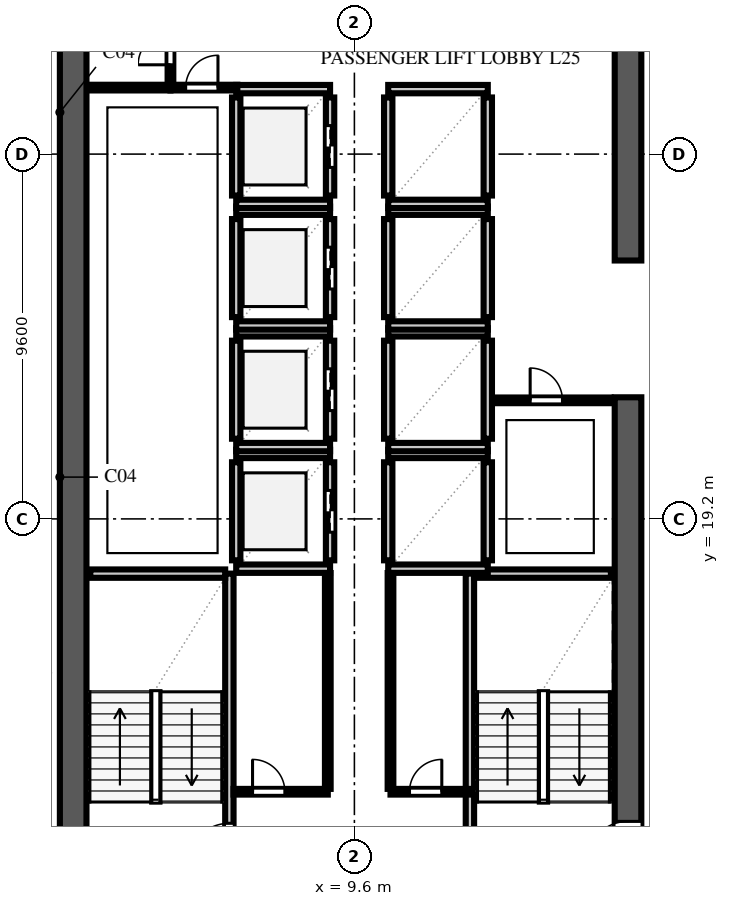
"""IFC4 building model, lengths in metres.
Left out: names, types, materials, properties, quantities, classifications, styles, units other than length and angle.
Written with IfcOpenShell. Run it as: python <this file> out.ifc"""

import sys

from ifc_helpers import new_model, si_unit, direction, frame, frame_2d, origin, place, context, subcontext, project, spatial, rectangle, extrude, element, fill, save


model = new_model("IFC4")
c1 = context("Model", 3, precision=1e-05, world=origin(), true_north=direction((0.0, 1.0)))
c2 = subcontext(c1, "Body", "Model", "MODEL_VIEW")
j1 = project(units=[si_unit("LENGTHUNIT", "METRE"), si_unit("PLANEANGLEUNIT", "RADIAN")], contexts=[c1])
p1 = place(None, origin())
s1 = spatial("IfcSite", under=j1, at=p1, CompositionType="ELEMENT")
p2 = place(p1, origin())
s2 = spatial("IfcBuilding", under=s1, at=p2, CompositionType="ELEMENT")
p3 = place(p2, frame((0.0, 0.0, 101.4)))
s3 = spatial("IfcBuildingStorey", under=s2, at=p3, CompositionType="ELEMENT", Elevation=101.4)
p4 = place(p3, frame((2.2, 9.25, 0.0), z_axis=(0.0, 0.0, 1.0), x_axis=(0.0, 1.0, 0.0)))
e1 = element("IfcWall", 1, at=p4, inside=s3, PredefinedType="SHEAR", context=c2, shape_type="SweptSolid", body=[
    extrude(rectangle(XDim=39.1, YDim=0.7, at=frame_2d((19.55, 0.0))), origin(), (0.0, 0.0, 1.0), 3.54),
])
p5 = place(p3, frame((16.8, 9.95, 0.0), z_axis=(0.0, 0.0, 1.0), x_axis=(0.0, 1.0, 0.0)))
e2 = element("IfcWall", 2, at=p5, inside=s3, PredefinedType="SHEAR", context=c2, shape_type="SweptSolid", body=[
    extrude(rectangle(XDim=12.45, YDim=0.7, at=frame_2d((6.225, 0.0))), origin(), (0.0, 0.0, 1.0), 3.54),
])
p6 = place(p5, frame((0.19, 0.0, 0.0)))
e3 = element("IfcOpeningElement", 3, at=p6, cuts=e2, PredefinedType="OPENING", context=c2, shape_type="SweptSolid", body=[
    extrude(rectangle(XDim=1.1, YDim=2.2, at=frame_2d((0.55, 1.1))), frame((0.0, 0.362, 0.0), z_axis=(0.0, -1.0, 0.0), x_axis=(1.0, 0.0, 0.0)), (0.0, 0.0, 1.0), 0.724),
])
p7 = place(p3, frame((16.8, 26.0, 0.0), z_axis=(0.0, 0.0, 1.0), x_axis=(0.0, 1.0, 0.0)))
e4 = element("IfcWall", 4, at=p7, inside=s3, PredefinedType="SHEAR", context=c2, shape_type="SweptSolid", body=[
    extrude(rectangle(XDim=7.8, YDim=0.7, at=frame_2d((3.9, 0.0))), origin(), (0.0, 0.0, 1.0), 3.54),
])
p8 = place(p3, frame((6.31, 9.95, 0.0), z_axis=(0.0, 0.0, 1.0), x_axis=(0.0, 1.0, 0.0)))
e5 = element("IfcWall", 5, at=p8, inside=s3, PredefinedType="SOLIDWALL", context=c2, shape_type="SweptSolid", body=[
    extrude(rectangle(XDim=7.81, YDim=0.22, at=frame_2d((3.905, 0.0))), origin(), (0.0, 0.0, 1.0), 3.54),
])
p9 = place(p8, frame((0.14, 0.0, 0.0)))
e6 = element("IfcOpeningElement", 6, at=p9, cuts=e5, PredefinedType="OPENING", context=c2, shape_type="SweptSolid", body=[
    extrude(rectangle(XDim=1.1, YDim=2.2, at=frame_2d((0.55, 1.1))), frame((0.0, 0.122, 0.0), z_axis=(0.0, -1.0, 0.0), x_axis=(1.0, 0.0, 0.0)), (0.0, 0.0, 1.0), 0.244),
])
p10 = place(p3, frame((2.65, 17.76, 0.0), z_axis=(0.0, 0.0, 1.0), x_axis=(1.0, 0.0, 0.0)))
e7 = element("IfcWall", 7, at=p10, inside=s3, PredefinedType="SOLIDWALL", context=c2, shape_type="SweptSolid", body=[
    extrude(rectangle(XDim=3.55, YDim=0.22, at=frame_2d((1.775, 0.0))), origin(), (0.0, 0.0, 1.0), 3.54),
])
p11 = place(p3, frame((12.64, 10.05, 0.0), z_axis=(0.0, 0.0, 1.0), x_axis=(0.0, 1.0, 0.0)))
e8 = element("IfcWall", 8, at=p11, inside=s3, PredefinedType="SOLIDWALL", context=c2, shape_type="SweptSolid", body=[
    extrude(rectangle(XDim=7.71, YDim=0.22, at=frame_2d((3.855, 0.0))), origin(), (0.0, 0.0, 1.0), 3.54),
])
p12 = place(p3, frame((12.75, 17.76, 0.0), z_axis=(0.0, 0.0, 1.0), x_axis=(1.0, 0.0, 0.0)))
e9 = element("IfcWall", 9, at=p12, inside=s3, PredefinedType="SOLIDWALL", context=c2, shape_type="SweptSolid", body=[
    extrude(rectangle(XDim=3.6, YDim=0.22, at=frame_2d((1.8, 0.0))), origin(), (0.0, 0.0, 1.0), 3.54),
])
p13 = place(p3, frame((6.49, 18.11, 0.0), z_axis=(0.0, 0.0, 1.0), x_axis=(0.0, 1.0, 0.0)))
e10 = element("IfcWall", 10, at=p13, inside=s3, PredefinedType="SOLIDWALL", context=c2, shape_type="SweptSolid", body=[
    extrude(rectangle(XDim=2.58, YDim=0.22, at=frame_2d((1.29, 0.0))), origin(), (0.0, 0.0, 1.0), 3.54),
])
p14 = place(p3, frame((8.96, 18.11, 0.0), z_axis=(0.0, 0.0, 1.0), x_axis=(0.0, 1.0, 0.0)))
e11 = element("IfcWall", 11, at=p14, inside=s3, PredefinedType="SOLIDWALL", context=c2, shape_type="SweptSolid", body=[
    extrude(rectangle(XDim=2.58, YDim=0.22, at=frame_2d((1.29, 0.0))), origin(), (0.0, 0.0, 1.0), 3.54),
])
p15 = place(p14, frame((0.74, 0.0, 0.0)))
e12 = element("IfcOpeningElement", 12, at=p15, cuts=e11, PredefinedType="OPENING", context=c2, shape_type="SweptSolid", body=[
    extrude(rectangle(XDim=1.1, YDim=2.2, at=frame_2d((0.55, 1.1))), frame((0.0, 0.122, 0.0), z_axis=(0.0, -1.0, 0.0), x_axis=(1.0, 0.0, 0.0)), (0.0, 0.0, 1.0), 0.244),
])
for number, where, z_axis, x_axis in (
    (13, (6.49, 17.89, 0.0), (0.0, 0.0, 1.0), (1.0, 0.0, 0.0)),
    (14, (6.49, 20.91, 0.0), (0.0, 0.0, 1.0), (1.0, 0.0, 0.0)),
):
    element("IfcWall", number, at=place(p3, frame(where, z_axis=z_axis, x_axis=x_axis)), inside=s3, PredefinedType="SOLIDWALL", context=c2, shape_type="SweptSolid", body=[
        extrude(rectangle(XDim=2.47, YDim=0.22, at=frame_2d((1.235, 0.0))), origin(), (0.0, 0.0, 1.0), 3.54),
    ])
p16 = place(p3, frame((6.49, 21.31, 0.0), z_axis=(0.0, 0.0, 1.0), x_axis=(0.0, 1.0, 0.0)))
e15 = element("IfcWall", 15, at=p16, inside=s3, PredefinedType="SOLIDWALL", context=c2, shape_type="SweptSolid", body=[
    extrude(rectangle(XDim=2.58, YDim=0.22, at=frame_2d((1.29, 0.0))), origin(), (0.0, 0.0, 1.0), 3.54),
])
p17 = place(p3, frame((8.96, 21.31, 0.0), z_axis=(0.0, 0.0, 1.0), x_axis=(0.0, 1.0, 0.0)))
e16 = element("IfcWall", 16, at=p17, inside=s3, PredefinedType="SOLIDWALL", context=c2, shape_type="SweptSolid", body=[
    extrude(rectangle(XDim=2.58, YDim=0.22, at=frame_2d((1.29, 0.0))), origin(), (0.0, 0.0, 1.0), 3.54),
])
p18 = place(p17, frame((0.74, 0.0, 0.0)))
e17 = element("IfcOpeningElement", 17, at=p18, cuts=e16, PredefinedType="OPENING", context=c2, shape_type="SweptSolid", body=[
    extrude(rectangle(XDim=1.1, YDim=2.2, at=frame_2d((0.55, 1.1))), frame((0.0, 0.122, 0.0), z_axis=(0.0, -1.0, 0.0), x_axis=(1.0, 0.0, 0.0)), (0.0, 0.0, 1.0), 0.244),
])
for number, where, z_axis, x_axis in (
    (18, (6.49, 21.09, 0.0), (0.0, 0.0, 1.0), (1.0, 0.0, 0.0)),
    (19, (6.49, 24.11, 0.0), (0.0, 0.0, 1.0), (1.0, 0.0, 0.0)),
):
    element("IfcWall", number, at=place(p3, frame(where, z_axis=z_axis, x_axis=x_axis)), inside=s3, PredefinedType="SOLIDWALL", context=c2, shape_type="SweptSolid", body=[
        extrude(rectangle(XDim=2.47, YDim=0.22, at=frame_2d((1.235, 0.0))), origin(), (0.0, 0.0, 1.0), 3.54),
    ])
p19 = place(p3, frame((6.49, 24.51, 0.0), z_axis=(0.0, 0.0, 1.0), x_axis=(0.0, 1.0, 0.0)))
e20 = element("IfcWall", 20, at=p19, inside=s3, PredefinedType="SOLIDWALL", context=c2, shape_type="SweptSolid", body=[
    extrude(rectangle(XDim=2.58, YDim=0.22, at=frame_2d((1.29, 0.0))), origin(), (0.0, 0.0, 1.0), 3.54),
])
p20 = place(p3, frame((8.96, 24.51, 0.0), z_axis=(0.0, 0.0, 1.0), x_axis=(0.0, 1.0, 0.0)))
e21 = element("IfcWall", 21, at=p20, inside=s3, PredefinedType="SOLIDWALL", context=c2, shape_type="SweptSolid", body=[
    extrude(rectangle(XDim=2.58, YDim=0.22, at=frame_2d((1.29, 0.0))), origin(), (0.0, 0.0, 1.0), 3.54),
])
p21 = place(p20, frame((0.74, 0.0, 0.0)))
e22 = element("IfcOpeningElement", 22, at=p21, cuts=e21, PredefinedType="OPENING", context=c2, shape_type="SweptSolid", body=[
    extrude(rectangle(XDim=1.1, YDim=2.2, at=frame_2d((0.55, 1.1))), frame((0.0, 0.122, 0.0), z_axis=(0.0, -1.0, 0.0), x_axis=(1.0, 0.0, 0.0)), (0.0, 0.0, 1.0), 0.244),
])
for number, where, z_axis, x_axis in (
    (23, (6.49, 24.29, 0.0), (0.0, 0.0, 1.0), (1.0, 0.0, 0.0)),
    (24, (6.49, 27.31, 0.0), (0.0, 0.0, 1.0), (1.0, 0.0, 0.0)),
):
    element("IfcWall", number, at=place(p3, frame(where, z_axis=z_axis, x_axis=x_axis)), inside=s3, PredefinedType="SOLIDWALL", context=c2, shape_type="SweptSolid", body=[
        extrude(rectangle(XDim=2.47, YDim=0.22, at=frame_2d((1.235, 0.0))), origin(), (0.0, 0.0, 1.0), 3.54),
    ])
p22 = place(p3, frame((6.49, 27.71, 0.0), z_axis=(0.0, 0.0, 1.0), x_axis=(0.0, 1.0, 0.0)))
e25 = element("IfcWall", 25, at=p22, inside=s3, PredefinedType="SOLIDWALL", context=c2, shape_type="SweptSolid", body=[
    extrude(rectangle(XDim=2.58, YDim=0.22, at=frame_2d((1.29, 0.0))), origin(), (0.0, 0.0, 1.0), 3.54),
])
p23 = place(p3, frame((8.96, 27.71, 0.0), z_axis=(0.0, 0.0, 1.0), x_axis=(0.0, 1.0, 0.0)))
e26 = element("IfcWall", 26, at=p23, inside=s3, PredefinedType="SOLIDWALL", context=c2, shape_type="SweptSolid", body=[
    extrude(rectangle(XDim=2.58, YDim=0.22, at=frame_2d((1.29, 0.0))), origin(), (0.0, 0.0, 1.0), 3.54),
])
p24 = place(p23, frame((0.74, 0.0, 0.0)))
e27 = element("IfcOpeningElement", 27, at=p24, cuts=e26, PredefinedType="OPENING", context=c2, shape_type="SweptSolid", body=[
    extrude(rectangle(XDim=1.1, YDim=2.2, at=frame_2d((0.55, 1.1))), frame((0.0, 0.122, 0.0), z_axis=(0.0, -1.0, 0.0), x_axis=(1.0, 0.0, 0.0)), (0.0, 0.0, 1.0), 0.244),
])
for number, where, z_axis, x_axis in (
    (28, (6.49, 27.49, 0.0), (0.0, 0.0, 1.0), (1.0, 0.0, 0.0)),
    (29, (6.49, 30.51, 0.0), (0.0, 0.0, 1.0), (1.0, 0.0, 0.0)),
):
    element("IfcWall", number, at=place(p3, frame(where, z_axis=z_axis, x_axis=x_axis)), inside=s3, PredefinedType="SOLIDWALL", context=c2, shape_type="SweptSolid", body=[
        extrude(rectangle(XDim=2.47, YDim=0.22, at=frame_2d((1.235, 0.0))), origin(), (0.0, 0.0, 1.0), 3.54),
    ])
for number, where, z_axis, x_axis in (
    (30, (10.49, 18.11, 0.0), (0.0, 0.0, 1.0), (0.0, 1.0, 0.0)),
    (31, (13.11, 18.11, 0.0), (0.0, 0.0, 1.0), (0.0, 1.0, 0.0)),
):
    element("IfcWall", number, at=place(p3, frame(where, z_axis=z_axis, x_axis=x_axis)), inside=s3, PredefinedType="SOLIDWALL", context=c2, shape_type="SweptSolid", body=[
        extrude(rectangle(XDim=2.58, YDim=0.22, at=frame_2d((1.29, 0.0))), origin(), (0.0, 0.0, 1.0), 3.54),
    ])
for number, where, z_axis, x_axis in (
    (32, (10.49, 17.89, 0.0), (0.0, 0.0, 1.0), (1.0, 0.0, 0.0)),
    (33, (10.49, 20.91, 0.0), (0.0, 0.0, 1.0), (1.0, 0.0, 0.0)),
):
    element("IfcWall", number, at=place(p3, frame(where, z_axis=z_axis, x_axis=x_axis)), inside=s3, PredefinedType="SOLIDWALL", context=c2, shape_type="SweptSolid", body=[
        extrude(rectangle(XDim=2.62, YDim=0.22, at=frame_2d((1.31, 0.0))), origin(), (0.0, 0.0, 1.0), 3.54),
    ])
for number, where, z_axis, x_axis in (
    (34, (10.49, 21.31, 0.0), (0.0, 0.0, 1.0), (0.0, 1.0, 0.0)),
    (35, (13.11, 21.31, 0.0), (0.0, 0.0, 1.0), (0.0, 1.0, 0.0)),
):
    element("IfcWall", number, at=place(p3, frame(where, z_axis=z_axis, x_axis=x_axis)), inside=s3, PredefinedType="SOLIDWALL", context=c2, shape_type="SweptSolid", body=[
        extrude(rectangle(XDim=2.58, YDim=0.22, at=frame_2d((1.29, 0.0))), origin(), (0.0, 0.0, 1.0), 3.54),
    ])
for number, where, z_axis, x_axis in (
    (36, (10.49, 21.09, 0.0), (0.0, 0.0, 1.0), (1.0, 0.0, 0.0)),
    (37, (10.49, 24.11, 0.0), (0.0, 0.0, 1.0), (1.0, 0.0, 0.0)),
):
    element("IfcWall", number, at=place(p3, frame(where, z_axis=z_axis, x_axis=x_axis)), inside=s3, PredefinedType="SOLIDWALL", context=c2, shape_type="SweptSolid", body=[
        extrude(rectangle(XDim=2.62, YDim=0.22, at=frame_2d((1.31, 0.0))), origin(), (0.0, 0.0, 1.0), 3.54),
    ])
for number, where, z_axis, x_axis in (
    (38, (10.49, 24.51, 0.0), (0.0, 0.0, 1.0), (0.0, 1.0, 0.0)),
    (39, (13.11, 24.51, 0.0), (0.0, 0.0, 1.0), (0.0, 1.0, 0.0)),
):
    element("IfcWall", number, at=place(p3, frame(where, z_axis=z_axis, x_axis=x_axis)), inside=s3, PredefinedType="SOLIDWALL", context=c2, shape_type="SweptSolid", body=[
        extrude(rectangle(XDim=2.58, YDim=0.22, at=frame_2d((1.29, 0.0))), origin(), (0.0, 0.0, 1.0), 3.54),
    ])
for number, where, z_axis, x_axis in (
    (40, (10.49, 24.29, 0.0), (0.0, 0.0, 1.0), (1.0, 0.0, 0.0)),
    (41, (10.49, 27.31, 0.0), (0.0, 0.0, 1.0), (1.0, 0.0, 0.0)),
):
    element("IfcWall", number, at=place(p3, frame(where, z_axis=z_axis, x_axis=x_axis)), inside=s3, PredefinedType="SOLIDWALL", context=c2, shape_type="SweptSolid", body=[
        extrude(rectangle(XDim=2.62, YDim=0.22, at=frame_2d((1.31, 0.0))), origin(), (0.0, 0.0, 1.0), 3.54),
    ])
for number, where, z_axis, x_axis in (
    (42, (10.49, 27.71, 0.0), (0.0, 0.0, 1.0), (0.0, 1.0, 0.0)),
    (43, (13.11, 27.71, 0.0), (0.0, 0.0, 1.0), (0.0, 1.0, 0.0)),
):
    element("IfcWall", number, at=place(p3, frame(where, z_axis=z_axis, x_axis=x_axis)), inside=s3, PredefinedType="SOLIDWALL", context=c2, shape_type="SweptSolid", body=[
        extrude(rectangle(XDim=2.58, YDim=0.22, at=frame_2d((1.29, 0.0))), origin(), (0.0, 0.0, 1.0), 3.54),
    ])
for number, where, z_axis, x_axis in (
    (44, (10.49, 27.49, 0.0), (0.0, 0.0, 1.0), (1.0, 0.0, 0.0)),
    (45, (10.49, 30.51, 0.0), (0.0, 0.0, 1.0), (1.0, 0.0, 0.0)),
):
    element("IfcWall", number, at=place(p3, frame(where, z_axis=z_axis, x_axis=x_axis)), inside=s3, PredefinedType="SOLIDWALL", context=c2, shape_type="SweptSolid", body=[
        extrude(rectangle(XDim=2.62, YDim=0.22, at=frame_2d((1.31, 0.0))), origin(), (0.0, 0.0, 1.0), 3.54),
    ])
p25 = place(p3, frame((6.42, 12.02, 0.0), z_axis=(0.0, 0.0, 1.0), x_axis=(1.0, 0.0, 0.0)))
e46 = element("IfcWall", 46, at=p25, inside=s3, PredefinedType="PARTITIONING", context=c2, shape_type="SweptSolid", body=[
    extrude(rectangle(XDim=2.48, YDim=0.15, at=frame_2d((1.24, 0.0))), origin(), (0.0, 0.0, 1.0), 3.54),
])
p26 = place(p25, frame((0.5, 0.0, 0.0)))
e47 = element("IfcOpeningElement", 47, at=p26, cuts=e46, PredefinedType="OPENING", context=c2, shape_type="SweptSolid", body=[
    extrude(rectangle(XDim=0.85, YDim=2.1, at=frame_2d((0.425, 1.05))), frame((0.0, 0.087, 0.0), z_axis=(0.0, -1.0, 0.0), x_axis=(1.0, 0.0, 0.0)), (0.0, 0.0, 1.0), 0.174),
])
p27 = place(p3, frame((10.55, 12.02, 0.0), z_axis=(0.0, 0.0, 1.0), x_axis=(1.0, 0.0, 0.0)))
e48 = element("IfcWall", 48, at=p27, inside=s3, PredefinedType="PARTITIONING", context=c2, shape_type="SweptSolid", body=[
    extrude(rectangle(XDim=2.08, YDim=0.15, at=frame_2d((1.04, 0.0))), origin(), (0.0, 0.0, 1.0), 3.54),
])
p28 = place(p27, frame((0.5, 0.0, 0.0)))
e49 = element("IfcOpeningElement", 49, at=p28, cuts=e48, PredefinedType="OPENING", context=c2, shape_type="SweptSolid", body=[
    extrude(rectangle(XDim=0.85, YDim=2.1, at=frame_2d((0.425, 1.05))), frame((0.0, 0.087, 0.0), z_axis=(0.0, -1.0, 0.0), x_axis=(1.0, 0.0, 0.0)), (0.0, 0.0, 1.0), 0.174),
])
for number, where, z_axis, x_axis in (
    (50, (8.9, 12.095, 0.0), (0.0, 0.0, 1.0), (0.0, 1.0, 0.0)),
    (51, (10.55, 12.095, 0.0), (0.0, 0.0, 1.0), (0.0, 1.0, 0.0)),
):
    element("IfcWall", number, at=place(p3, frame(where, z_axis=z_axis, x_axis=x_axis)), inside=s3, PredefinedType="PARTITIONING", context=c2, shape_type="SweptSolid", body=[
        extrude(rectangle(XDim=5.68, YDim=0.15, at=frame_2d((2.84, 0.0))), origin(), (0.0, 0.0, 1.0), 3.54),
    ])
p29 = place(p3, frame((13.225, 22.32, 0.0), z_axis=(0.0, 0.0, 1.0), x_axis=(1.0, 0.0, 0.0)))
e52 = element("IfcWall", 52, at=p29, inside=s3, PredefinedType="PARTITIONING", context=c2, shape_type="SweptSolid", body=[
    extrude(rectangle(XDim=3.12, YDim=0.15, at=frame_2d((1.56, 0.0))), origin(), (0.0, 0.0, 1.0), 3.54),
])
p30 = place(p29, frame((1.0, 0.0, 0.0)))
e53 = element("IfcOpeningElement", 53, at=p30, cuts=e52, PredefinedType="OPENING", context=c2, shape_type="SweptSolid", body=[
    extrude(rectangle(XDim=0.85, YDim=2.1, at=frame_2d((0.425, 1.05))), frame((0.0, 0.087, 0.0), z_axis=(0.0, -1.0, 0.0), x_axis=(1.0, 0.0, 0.0)), (0.0, 0.0, 1.0), 0.174),
])
p31 = place(p3, frame((4.76, 30.55, 0.0), z_axis=(0.0, 0.0, 1.0), x_axis=(0.0, 1.0, 0.0)))
e54 = element("IfcWall", 54, at=p31, inside=s3, PredefinedType="PARTITIONING", context=c2, shape_type="SweptSolid", body=[
    extrude(rectangle(XDim=2.93, YDim=0.15, at=frame_2d((1.465, 0.0))), origin(), (0.0, 0.0, 1.0), 3.54),
])
p32 = place(p31, frame((0.6, 0.0, 0.0)))
e55 = element("IfcOpeningElement", 55, at=p32, cuts=e54, PredefinedType="OPENING", context=c2, shape_type="SweptSolid", body=[
    extrude(rectangle(XDim=0.85, YDim=2.1, at=frame_2d((0.425, 1.05))), frame((0.0, 0.087, 0.0), z_axis=(0.0, -1.0, 0.0), x_axis=(1.0, 0.0, 0.0)), (0.0, 0.0, 1.0), 0.174),
])
p33 = place(p3, frame((4.76, 30.55, 0.0), z_axis=(0.0, 0.0, 1.0), x_axis=(1.0, 0.0, 0.0)))
e56 = element("IfcWall", 56, at=p33, inside=s3, PredefinedType="PARTITIONING", context=c2, shape_type="SweptSolid", body=[
    extrude(rectangle(XDim=1.76, YDim=0.15, at=frame_2d((0.88, 0.0))), origin(), (0.0, 0.0, 1.0), 3.54),
])
p34 = place(p33, frame((0.4, 0.0, 0.0)))
e57 = element("IfcOpeningElement", 57, at=p34, cuts=e56, PredefinedType="OPENING", context=c2, shape_type="SweptSolid", body=[
    extrude(rectangle(XDim=0.85, YDim=2.1, at=frame_2d((0.425, 1.05))), frame((0.0, 0.087, 0.0), z_axis=(0.0, -1.0, 0.0), x_axis=(1.0, 0.0, 0.0)), (0.0, 0.0, 1.0), 0.174),
])
p35 = place(p3, frame((2.65, 30.55, 0.0), z_axis=(0.0, 0.0, 1.0), x_axis=(1.0, 0.0, 0.0)))
e58 = element("IfcWall", 58, at=p35, inside=s3, PredefinedType="PARTITIONING", context=c2, shape_type="SweptSolid", body=[
    extrude(rectangle(XDim=2.11, YDim=0.15, at=frame_2d((1.055, 0.0))), origin(), (0.0, 0.0, 1.0), 3.54),
])
p36 = place(p9, origin())
e59 = element("IfcDoor", 59, at=p36, inside=s3, OperationType="SINGLE_SWING_LEFT", PredefinedType="DOOR", context=c2, shape_type="SweptSolid", body=[
    extrude(rectangle(XDim=1.1, YDim=2.2, at=frame_2d((0.55, 1.1))), frame((0.0, 0.025, 0.0), z_axis=(0.0, -1.0, 0.0), x_axis=(1.0, 0.0, 0.0)), (0.0, 0.0, 1.0), 0.05),
])
fill(e6, e59)
p37 = place(p6, origin())
e60 = element("IfcDoor", 60, at=p37, inside=s3, OperationType="SINGLE_SWING_LEFT", PredefinedType="DOOR", context=c2, shape_type="SweptSolid", body=[
    extrude(rectangle(XDim=1.1, YDim=2.2, at=frame_2d((0.55, 1.1))), frame((0.0, 0.025, 0.0), z_axis=(0.0, -1.0, 0.0), x_axis=(1.0, 0.0, 0.0)), (0.0, 0.0, 1.0), 0.05),
])
fill(e3, e60)
p38 = place(p15, origin())
e61 = element("IfcDoor", 61, at=p38, inside=s3, OperationType="DOUBLE_DOOR_SLIDING", PredefinedType="DOOR", context=c2, shape_type="SweptSolid", body=[
    extrude(rectangle(XDim=1.1, YDim=2.2, at=frame_2d((0.55, 1.1))), frame((0.0, 0.025, 0.0), z_axis=(0.0, -1.0, 0.0), x_axis=(1.0, 0.0, 0.0)), (0.0, 0.0, 1.0), 0.05),
])
fill(e12, e61)
p39 = place(p18, origin())
e62 = element("IfcDoor", 62, at=p39, inside=s3, OperationType="DOUBLE_DOOR_SLIDING", PredefinedType="DOOR", context=c2, shape_type="SweptSolid", body=[
    extrude(rectangle(XDim=1.1, YDim=2.2, at=frame_2d((0.55, 1.1))), frame((0.0, 0.025, 0.0), z_axis=(0.0, -1.0, 0.0), x_axis=(1.0, 0.0, 0.0)), (0.0, 0.0, 1.0), 0.05),
])
fill(e17, e62)
p40 = place(p21, origin())
e63 = element("IfcDoor", 63, at=p40, inside=s3, OperationType="DOUBLE_DOOR_SLIDING", PredefinedType="DOOR", context=c2, shape_type="SweptSolid", body=[
    extrude(rectangle(XDim=1.1, YDim=2.2, at=frame_2d((0.55, 1.1))), frame((0.0, 0.025, 0.0), z_axis=(0.0, -1.0, 0.0), x_axis=(1.0, 0.0, 0.0)), (0.0, 0.0, 1.0), 0.05),
])
fill(e22, e63)
p41 = place(p24, origin())
e64 = element("IfcDoor", 64, at=p41, inside=s3, OperationType="DOUBLE_DOOR_SLIDING", PredefinedType="DOOR", context=c2, shape_type="SweptSolid", body=[
    extrude(rectangle(XDim=1.1, YDim=2.2, at=frame_2d((0.55, 1.1))), frame((0.0, 0.025, 0.0), z_axis=(0.0, -1.0, 0.0), x_axis=(1.0, 0.0, 0.0)), (0.0, 0.0, 1.0), 0.05),
])
fill(e27, e64)
p42 = place(p26, origin())
e65 = element("IfcDoor", 65, at=p42, inside=s3, OperationType="SINGLE_SWING_LEFT", PredefinedType="DOOR", context=c2, shape_type="SweptSolid", body=[
    extrude(rectangle(XDim=0.85, YDim=2.1, at=frame_2d((0.425, 1.05))), frame((0.0, 0.025, 0.0), z_axis=(0.0, -1.0, 0.0), x_axis=(1.0, 0.0, 0.0)), (0.0, 0.0, 1.0), 0.05),
])
fill(e47, e65)
p43 = place(p28, origin())
e66 = element("IfcDoor", 66, at=p43, inside=s3, OperationType="SINGLE_SWING_RIGHT", PredefinedType="DOOR", context=c2, shape_type="SweptSolid", body=[
    extrude(rectangle(XDim=0.85, YDim=2.1, at=frame_2d((0.425, 1.05))), frame((0.0, 0.025, 0.0), z_axis=(0.0, -1.0, 0.0), x_axis=(1.0, 0.0, 0.0)), (0.0, 0.0, 1.0), 0.05),
])
fill(e49, e66)
p44 = place(p30, origin())
e67 = element("IfcDoor", 67, at=p44, inside=s3, OperationType="SINGLE_SWING_LEFT", PredefinedType="DOOR", context=c2, shape_type="SweptSolid", body=[
    extrude(rectangle(XDim=0.85, YDim=2.1, at=frame_2d((0.425, 1.05))), frame((0.0, 0.025, 0.0), z_axis=(0.0, -1.0, 0.0), x_axis=(1.0, 0.0, 0.0)), (0.0, 0.0, 1.0), 0.05),
])
fill(e53, e67)
p45 = place(p32, origin())
e68 = element("IfcDoor", 68, at=p45, inside=s3, OperationType="SINGLE_SWING_LEFT", PredefinedType="DOOR", context=c2, shape_type="SweptSolid", body=[
    extrude(rectangle(XDim=0.85, YDim=2.1, at=frame_2d((0.425, 1.05))), frame((0.0, 0.025, 0.0), z_axis=(0.0, -1.0, 0.0), x_axis=(1.0, 0.0, 0.0)), (0.0, 0.0, 1.0), 0.05),
])
fill(e55, e68)
p46 = place(p34, origin())
e69 = element("IfcDoor", 69, at=p46, inside=s3, OperationType="SINGLE_SWING_RIGHT", PredefinedType="DOOR", context=c2, shape_type="SweptSolid", body=[
    extrude(rectangle(XDim=0.85, YDim=2.1, at=frame_2d((0.425, 1.05))), frame((0.0, 0.025, 0.0), z_axis=(0.0, -1.0, 0.0), x_axis=(1.0, 0.0, 0.0)), (0.0, 0.0, 1.0), 0.05),
])
fill(e57, e69)
save(model, sys.argv[1])
